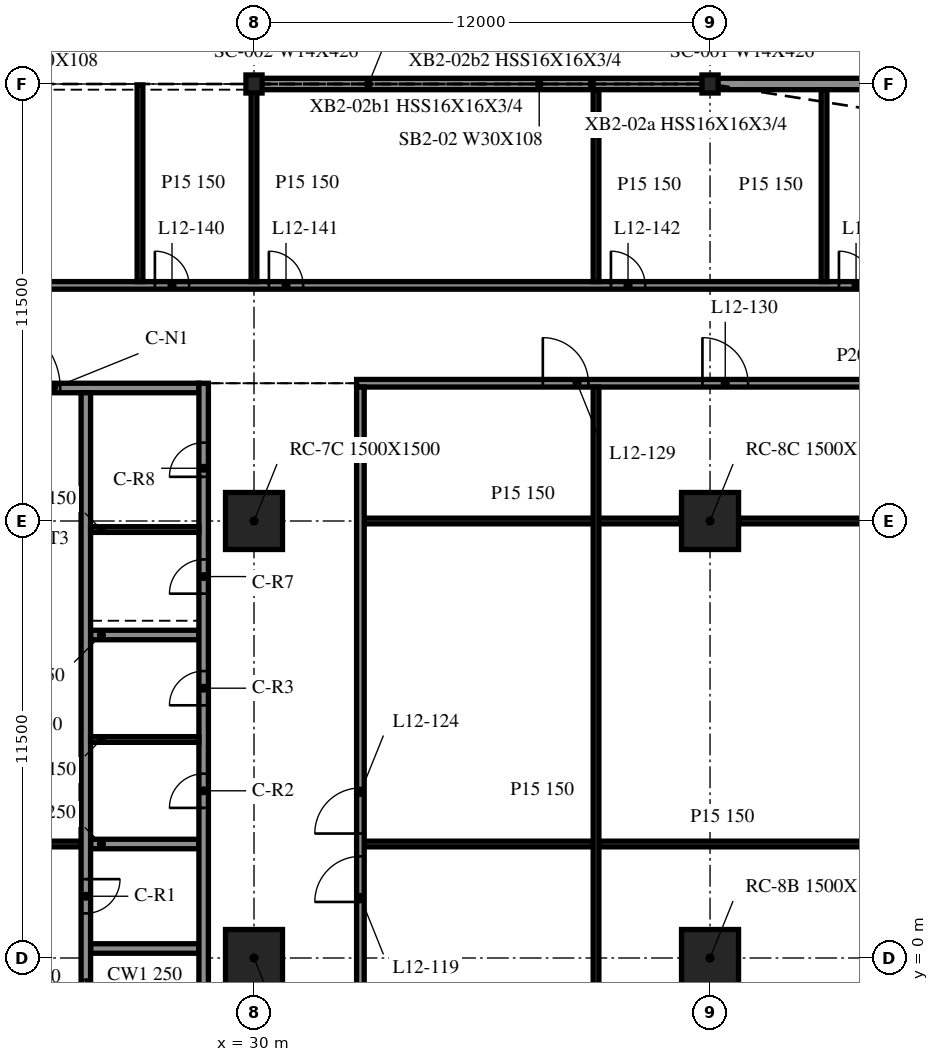
"""IFC4 building model, lengths in metres.
Left out: names, types, materials, properties, quantities, classifications, styles, units other than length and angle.
Written with IfcOpenShell. Run it as: python <this file> out.ifc"""

import sys

from ifc_helpers import new_model, si_unit, direction, frame, frame_2d, origin, origin_2d, place, context, subcontext, project, spatial, rectangle, i_section, extrude, element, fill, save


model = new_model("IFC4")
c1 = context("Model", 3, precision=1e-05, world=origin(), true_north=direction((0.0, 1.0)))
c2 = subcontext(c1, "Body", "Model", "MODEL_VIEW")
j1 = project(units=[si_unit("LENGTHUNIT", "METRE"), si_unit("PLANEANGLEUNIT", "RADIAN")], contexts=[c1])
p1 = place(None, origin())
s1 = spatial("IfcSite", under=j1, at=p1, CompositionType="ELEMENT")
p2 = place(p1, origin())
s2 = spatial("IfcBuilding", under=s1, at=p2, CompositionType="ELEMENT")
p3 = place(p2, frame((0.0, 0.0, 54.6)))
s3 = spatial("IfcBuildingStorey", under=s2, at=p3, CompositionType="ELEMENT", Elevation=54.6)
for number, where, z_axis, x_axis in (
    (1, (30.0, 0.0, -0.34), (0.0, 0.0, 1.0), (1.0, 0.0, 0.0)),
    (2, (30.0, 11.5, -0.34), (0.0, 0.0, 1.0), (1.0, 0.0, 0.0)),
    (3, (42.0, 0.0, -0.34), (0.0, 0.0, 1.0), (1.0, 0.0, 0.0)),
    (4, (42.0, 11.5, -0.34), (0.0, 0.0, 1.0), (1.0, 0.0, 0.0)),
):
    element("IfcColumn", number, at=place(p3, frame(where, z_axis=z_axis, x_axis=x_axis)), inside=s3, PredefinedType="COLUMN", context=c2, shape_type="SweptSolid", body=[
        extrude(rectangle(XDim=1.5, YDim=1.5, at=origin_2d()), origin(), (0.0, 0.0, 1.0), 4.3),
    ])
for number, where, z_axis, x_axis in (
    (5, (42.0, 23.0, -0.34), (0.0, 0.0, 1.0), (1.0, 0.0, 0.0)),
    (6, (30.0, 23.0, -0.34), (0.0, 0.0, 1.0), (1.0, 0.0, 0.0)),
):
    element("IfcColumn", number, at=place(p3, frame(where, z_axis=z_axis, x_axis=x_axis)), inside=s3, PredefinedType="COLUMN", context=c2, shape_type="SweptSolid", body=[
        extrude(i_section(OverallWidth=0.424, OverallDepth=0.475, WebThickness=0.048, FlangeThickness=0.077, at=origin_2d()), origin(), (0.0, 0.0, 1.0), 4.3),
    ])
p4 = place(p3, frame((48.0, 23.0, 0.0), z_axis=(0.0, 0.0, 1.0), x_axis=(-1.0, 0.0, 0.0)))
e7 = element("IfcWall", 7, at=p4, inside=s3, PredefinedType="NOTDEFINED", context=c2, shape_type="SweptSolid", body=[
    extrude(rectangle(XDim=5.976, YDim=0.3, at=frame_2d((2.988, 0.0))), origin(), (0.0, 0.0, 1.0), 3.203),
])
p5 = place(p3, frame((41.976, 23.0, 0.0), z_axis=(0.0, 0.0, 1.0), x_axis=(-1.0, 0.0, 0.0)))
e8 = element("IfcWall", 8, at=p5, inside=s3, PredefinedType="NOTDEFINED", context=c2, shape_type="SweptSolid", body=[
    extrude(rectangle(XDim=11.952, YDim=0.3, at=frame_2d((5.976, 0.0))), origin(), (0.0, 0.0, 1.0), 3.203),
])
p6 = place(p3, frame((28.675, -9.125, 0.0), z_axis=(0.0, 0.0, 1.0), x_axis=(0.0, 1.0, 0.0)))
e9 = element("IfcWall", 9, at=p6, inside=s3, PredefinedType="SOLIDWALL", context=c2, shape_type="SweptSolid", body=[
    extrude(rectangle(XDim=24.25, YDim=0.25, at=frame_2d((12.125, 0.0))), origin(), (0.0, 0.0, 1.0), 3.96),
])
p7 = place(p6, frame((13.075, 0.0, 0.0)))
e10 = element("IfcOpeningElement", 10, at=p7, cuts=e9, PredefinedType="OPENING", context=c2, shape_type="SweptSolid", body=[
    extrude(rectangle(XDim=0.9, YDim=2.1, at=frame_2d((0.45, 1.05))), frame((0.0, 0.135, 0.0), z_axis=(0.0, -1.0, 0.0), x_axis=(1.0, 0.0, 0.0)), (0.0, 0.0, 1.0), 0.27),
])
p8 = place(p6, frame((15.775, 0.0, 0.0)))
e11 = element("IfcOpeningElement", 11, at=p8, cuts=e9, PredefinedType="OPENING", context=c2, shape_type="SweptSolid", body=[
    extrude(rectangle(XDim=0.9, YDim=2.1, at=frame_2d((0.45, 1.05))), frame((0.0, 0.135, 0.0), z_axis=(0.0, -1.0, 0.0), x_axis=(1.0, 0.0, 0.0)), (0.0, 0.0, 1.0), 0.27),
])
p9 = place(p6, frame((18.712, 0.0, 0.0)))
e12 = element("IfcOpeningElement", 12, at=p9, cuts=e9, PredefinedType="OPENING", context=c2, shape_type="SweptSolid", body=[
    extrude(rectangle(XDim=0.9, YDim=2.1, at=frame_2d((0.45, 1.05))), frame((0.0, 0.135, 0.0), z_axis=(0.0, -1.0, 0.0), x_axis=(1.0, 0.0, 0.0)), (0.0, 0.0, 1.0), 0.27),
])
p10 = place(p6, frame((21.788, 0.0, 0.0)))
e13 = element("IfcOpeningElement", 13, at=p10, cuts=e9, PredefinedType="OPENING", context=c2, shape_type="SweptSolid", body=[
    extrude(rectangle(XDim=0.9, YDim=2.1, at=frame_2d((0.45, 1.05))), frame((0.0, 0.135, 0.0), z_axis=(0.0, -1.0, 0.0), x_axis=(1.0, 0.0, 0.0)), (0.0, 0.0, 1.0), 0.27),
])
p11 = place(p3, frame((19.45, 15.0, 0.0), z_axis=(0.0, 0.0, 1.0), x_axis=(1.0, 0.0, 0.0)))
e14 = element("IfcWall", 14, at=p11, inside=s3, PredefinedType="SOLIDWALL", context=c2, shape_type="SweptSolid", body=[
    extrude(rectangle(XDim=9.1, YDim=0.25, at=frame_2d((4.55, 0.0))), origin(), (0.0, 0.0, 1.0), 3.96),
])
p12 = place(p11, frame((3.65, 0.0, 0.0)))
e15 = element("IfcOpeningElement", 15, at=p12, cuts=e14, PredefinedType="OPENING", context=c2, shape_type="SweptSolid", body=[
    extrude(rectangle(XDim=1.8, YDim=2.1, at=frame_2d((0.9, 1.05))), frame((0.0, 0.135, 0.0), z_axis=(0.0, -1.0, 0.0), x_axis=(1.0, 0.0, 0.0)), (0.0, 0.0, 1.0), 0.27),
])
p13 = place(p3, frame((25.575, 14.875, 0.0), z_axis=(0.0, 0.0, 1.0), x_axis=(0.0, -1.0, 0.0)))
e16 = element("IfcWall", 16, at=p13, inside=s3, PredefinedType="SOLIDWALL", context=c2, shape_type="SweptSolid", body=[
    extrude(rectangle(XDim=17.5, YDim=0.25, at=frame_2d((8.75, 0.0))), origin(), (0.0, 0.0, 1.0), 3.96),
])
p14 = place(p13, frame((15.45, 0.0, 0.0)))
e17 = element("IfcOpeningElement", 17, at=p14, cuts=e16, PredefinedType="OPENING", context=c2, shape_type="SweptSolid", body=[
    extrude(rectangle(XDim=1.1, YDim=2.1, at=frame_2d((0.55, 1.05))), frame((0.0, 0.135, 0.0), z_axis=(0.0, -1.0, 0.0), x_axis=(1.0, 0.0, 0.0)), (0.0, 0.0, 1.0), 0.27),
])
p15 = place(p13, frame((12.8, 0.0, 0.0)))
e18 = element("IfcOpeningElement", 18, at=p15, cuts=e16, PredefinedType="OPENING", context=c2, shape_type="SweptSolid", body=[
    extrude(rectangle(XDim=0.9, YDim=2.1, at=frame_2d((0.45, 1.05))), frame((0.0, 0.135, 0.0), z_axis=(0.0, -1.0, 0.0), x_axis=(1.0, 0.0, 0.0)), (0.0, 0.0, 1.0), 0.27),
])
for number, where, z_axis, x_axis in (
    (19, (25.7, 0.25, 0.0), (0.0, 0.0, 1.0), (1.0, 0.0, 0.0)),
    (20, (25.7, 3.0, 0.0), (0.0, 0.0, 1.0), (1.0, 0.0, 0.0)),
    (21, (25.7, 8.5, 0.0), (0.0, 0.0, 1.0), (1.0, 0.0, 0.0)),
):
    element("IfcWall", number, at=place(p3, frame(where, z_axis=z_axis, x_axis=x_axis)), inside=s3, PredefinedType="SOLIDWALL", context=c2, shape_type="SweptSolid", body=[
        extrude(rectangle(XDim=2.85, YDim=0.25, at=frame_2d((1.425, 0.0))), origin(), (0.0, 0.0, 1.0), 3.96),
    ])
p16 = place(p3, frame((22.55, 3.0, 0.0), z_axis=(0.0, 0.0, 1.0), x_axis=(1.0, 0.0, 0.0)))
e22 = element("IfcWall", 22, at=p16, inside=s3, PredefinedType="PARTITIONING", context=c2, shape_type="SweptSolid", body=[
    extrude(rectangle(XDim=2.9, YDim=0.15, at=frame_2d((1.45, 0.0))), origin(), (0.0, 0.0, 1.0), 3.96),
])
for number, where, z_axis, x_axis in (
    (23, (25.7, 5.75, 0.0), (0.0, 0.0, 1.0), (1.0, 0.0, 0.0)),
    (24, (25.7, 11.275, 0.0), (0.0, 0.0, 1.0), (1.0, 0.0, 0.0)),
):
    element("IfcWall", number, at=place(p3, frame(where, z_axis=z_axis, x_axis=x_axis)), inside=s3, PredefinedType="PARTITIONING", context=c2, shape_type="SweptSolid", body=[
        extrude(rectangle(XDim=2.85, YDim=0.15, at=frame_2d((1.425, 0.0))), origin(), (0.0, 0.0, 1.0), 3.96),
    ])
p17 = place(p3, frame((32.9, 3.0, 0.0), z_axis=(0.0, 0.0, 1.0), x_axis=(1.0, 0.0, 0.0)))
e25 = element("IfcWall", 25, at=p17, inside=s3, PredefinedType="PARTITIONING", context=c2, shape_type="SweptSolid", body=[
    extrude(rectangle(XDim=18.85, YDim=0.15, at=frame_2d((9.425, 0.0))), origin(), (0.0, 0.0, 1.0), 3.96),
])
p18 = place(p3, frame((32.9, 11.5, 0.0), z_axis=(0.0, 0.0, 1.0), x_axis=(1.0, 0.0, 0.0)))
e26 = element("IfcWall", 26, at=p18, inside=s3, PredefinedType="PARTITIONING", context=c2, shape_type="SweptSolid", body=[
    extrude(rectangle(XDim=8.35, YDim=0.15, at=frame_2d((4.175, 0.0))), origin(), (0.0, 0.0, 1.0), 3.96),
])
p19 = place(p3, frame((42.75, 11.5, 0.0), z_axis=(0.0, 0.0, 1.0), x_axis=(1.0, 0.0, 0.0)))
e27 = element("IfcWall", 27, at=p19, inside=s3, PredefinedType="PARTITIONING", context=c2, shape_type="SweptSolid", body=[
    extrude(rectangle(XDim=9.0, YDim=0.15, at=frame_2d((4.5, 0.0))), origin(), (0.0, 0.0, 1.0), 3.96),
])
p20 = place(p3, frame((32.7, 15.125, 0.0), z_axis=(0.0, 0.0, 1.0), x_axis=(1.0, 0.0, 0.0)))
e28 = element("IfcWall", 28, at=p20, inside=s3, PredefinedType="PARTITIONING", context=c2, shape_type="SweptSolid", body=[
    extrude(rectangle(XDim=19.25, YDim=0.2, at=frame_2d((9.625, 0.0))), origin(), (0.0, 0.0, 1.0), 3.96),
])
p21 = place(p20, frame((4.9, 0.0, 0.0)))
e29 = element("IfcOpeningElement", 29, at=p21, cuts=e28, PredefinedType="OPENING", context=c2, shape_type="SweptSolid", body=[
    extrude(rectangle(XDim=1.2, YDim=2.1, at=frame_2d((0.6, 1.05))), frame((0.0, 0.11, 0.0), z_axis=(0.0, -1.0, 0.0), x_axis=(1.0, 0.0, 0.0)), (0.0, 0.0, 1.0), 0.22),
])
p22 = place(p20, frame((9.1, 0.0, 0.0)))
e30 = element("IfcOpeningElement", 30, at=p22, cuts=e28, PredefinedType="OPENING", context=c2, shape_type="SweptSolid", body=[
    extrude(rectangle(XDim=1.2, YDim=2.1, at=frame_2d((0.6, 1.05))), frame((0.0, 0.11, 0.0), z_axis=(0.0, -1.0, 0.0), x_axis=(1.0, 0.0, 0.0)), (0.0, 0.0, 1.0), 0.22),
])
p23 = place(p3, frame((-41.708, 17.7, 0.0), z_axis=(0.0, 0.0, 1.0), x_axis=(1.0, 0.0, 0.0)))
e31 = element("IfcWall", 31, at=p23, inside=s3, PredefinedType="PARTITIONING", context=c2, shape_type="SweptSolid", body=[
    extrude(rectangle(XDim=95.416, YDim=0.2, at=frame_2d((47.708, 0.0))), origin(), (0.0, 0.0, 1.0), 3.96),
])
p24 = place(p23, frame((7.5, 0.0, 0.0)))
e32 = element("IfcOpeningElement", 32, at=p24, cuts=e31, PredefinedType="OPENING", context=c2, shape_type="SweptSolid", body=[
    extrude(rectangle(XDim=0.9, YDim=2.1, at=frame_2d((0.45, 1.05))), frame((0.0, 0.11, 0.0), z_axis=(0.0, -1.0, 0.0), x_axis=(1.0, 0.0, 0.0)), (0.0, 0.0, 1.0), 0.22),
])
p25 = place(p23, frame((13.5, 0.0, 0.0)))
e33 = element("IfcOpeningElement", 33, at=p25, cuts=e31, PredefinedType="OPENING", context=c2, shape_type="SweptSolid", body=[
    extrude(rectangle(XDim=0.9, YDim=2.1, at=frame_2d((0.45, 1.05))), frame((0.0, 0.11, 0.0), z_axis=(0.0, -1.0, 0.0), x_axis=(1.0, 0.0, 0.0)), (0.0, 0.0, 1.0), 0.22),
])
p26 = place(p23, frame((19.5, 0.0, 0.0)))
e34 = element("IfcOpeningElement", 34, at=p26, cuts=e31, PredefinedType="OPENING", context=c2, shape_type="SweptSolid", body=[
    extrude(rectangle(XDim=0.9, YDim=2.1, at=frame_2d((0.45, 1.05))), frame((0.0, 0.11, 0.0), z_axis=(0.0, -1.0, 0.0), x_axis=(1.0, 0.0, 0.0)), (0.0, 0.0, 1.0), 0.22),
])
p27 = place(p23, frame((31.5, 0.0, 0.0)))
e35 = element("IfcOpeningElement", 35, at=p27, cuts=e31, PredefinedType="OPENING", context=c2, shape_type="SweptSolid", body=[
    extrude(rectangle(XDim=0.9, YDim=2.1, at=frame_2d((0.45, 1.05))), frame((0.0, 0.11, 0.0), z_axis=(0.0, -1.0, 0.0), x_axis=(1.0, 0.0, 0.0)), (0.0, 0.0, 1.0), 0.22),
])
p28 = place(p23, frame((34.5, 0.0, 0.0)))
e36 = element("IfcOpeningElement", 36, at=p28, cuts=e31, PredefinedType="OPENING", context=c2, shape_type="SweptSolid", body=[
    extrude(rectangle(XDim=0.9, YDim=2.1, at=frame_2d((0.45, 1.05))), frame((0.0, 0.11, 0.0), z_axis=(0.0, -1.0, 0.0), x_axis=(1.0, 0.0, 0.0)), (0.0, 0.0, 1.0), 0.22),
])
p29 = place(p23, frame((43.5, 0.0, 0.0)))
e37 = element("IfcOpeningElement", 37, at=p29, cuts=e31, PredefinedType="OPENING", context=c2, shape_type="SweptSolid", body=[
    extrude(rectangle(XDim=0.9, YDim=2.1, at=frame_2d((0.45, 1.05))), frame((0.0, 0.11, 0.0), z_axis=(0.0, -1.0, 0.0), x_axis=(1.0, 0.0, 0.0)), (0.0, 0.0, 1.0), 0.22),
])
p30 = place(p23, frame((47.3, 0.0, 0.0)))
e38 = element("IfcOpeningElement", 38, at=p30, cuts=e31, PredefinedType="OPENING", context=c2, shape_type="SweptSolid", body=[
    extrude(rectangle(XDim=0.9, YDim=2.1, at=frame_2d((0.45, 1.05))), frame((0.0, 0.11, 0.0), z_axis=(0.0, -1.0, 0.0), x_axis=(1.0, 0.0, 0.0)), (0.0, 0.0, 1.0), 0.22),
])
p31 = place(p23, frame((51.1, 0.0, 0.0)))
e39 = element("IfcOpeningElement", 39, at=p31, cuts=e31, PredefinedType="OPENING", context=c2, shape_type="SweptSolid", body=[
    extrude(rectangle(XDim=0.9, YDim=2.1, at=frame_2d((0.45, 1.05))), frame((0.0, 0.11, 0.0), z_axis=(0.0, -1.0, 0.0), x_axis=(1.0, 0.0, 0.0)), (0.0, 0.0, 1.0), 0.22),
])
p32 = place(p23, frame((57.1, 0.0, 0.0)))
e40 = element("IfcOpeningElement", 40, at=p32, cuts=e31, PredefinedType="OPENING", context=c2, shape_type="SweptSolid", body=[
    extrude(rectangle(XDim=0.9, YDim=2.1, at=frame_2d((0.45, 1.05))), frame((0.0, 0.11, 0.0), z_axis=(0.0, -1.0, 0.0), x_axis=(1.0, 0.0, 0.0)), (0.0, 0.0, 1.0), 0.22),
])
p33 = place(p23, frame((69.1, 0.0, 0.0)))
e41 = element("IfcOpeningElement", 41, at=p33, cuts=e31, PredefinedType="OPENING", context=c2, shape_type="SweptSolid", body=[
    extrude(rectangle(XDim=0.9, YDim=2.1, at=frame_2d((0.45, 1.05))), frame((0.0, 0.11, 0.0), z_axis=(0.0, -1.0, 0.0), x_axis=(1.0, 0.0, 0.0)), (0.0, 0.0, 1.0), 0.22),
])
p34 = place(p23, frame((72.1, 0.0, 0.0)))
e42 = element("IfcOpeningElement", 42, at=p34, cuts=e31, PredefinedType="OPENING", context=c2, shape_type="SweptSolid", body=[
    extrude(rectangle(XDim=0.9, YDim=2.1, at=frame_2d((0.45, 1.05))), frame((0.0, 0.11, 0.0), z_axis=(0.0, -1.0, 0.0), x_axis=(1.0, 0.0, 0.0)), (0.0, 0.0, 1.0), 0.22),
])
p35 = place(p23, frame((81.1, 0.0, 0.0)))
e43 = element("IfcOpeningElement", 43, at=p35, cuts=e31, PredefinedType="OPENING", context=c2, shape_type="SweptSolid", body=[
    extrude(rectangle(XDim=0.9, YDim=2.1, at=frame_2d((0.45, 1.05))), frame((0.0, 0.11, 0.0), z_axis=(0.0, -1.0, 0.0), x_axis=(1.0, 0.0, 0.0)), (0.0, 0.0, 1.0), 0.22),
])
p36 = place(p23, frame((87.1, 0.0, 0.0)))
e44 = element("IfcOpeningElement", 44, at=p36, cuts=e31, PredefinedType="OPENING", context=c2, shape_type="SweptSolid", body=[
    extrude(rectangle(XDim=0.9, YDim=2.1, at=frame_2d((0.45, 1.05))), frame((0.0, 0.11, 0.0), z_axis=(0.0, -1.0, 0.0), x_axis=(1.0, 0.0, 0.0)), (0.0, 0.0, 1.0), 0.22),
])
for number, where, z_axis, x_axis in (
    (45, (27.0, 17.8, 0.0), (0.0, 0.0, 1.0), (0.0, 1.0, 0.0)),
    (46, (30.0, 17.8, 0.0), (0.0, 0.0, 1.0), (0.0, 1.0, 0.0)),
):
    element("IfcWall", number, at=place(p3, frame(where, z_axis=z_axis, x_axis=x_axis)), inside=s3, PredefinedType="PARTITIONING", context=c2, shape_type="SweptSolid", body=[
        extrude(rectangle(XDim=5.175, YDim=0.15, at=frame_2d((2.587, 0.0))), origin(), (0.0, 0.0, 1.0), 3.96),
    ])
p37 = place(p3, frame((32.8, -9.025, 0.0), z_axis=(0.0, 0.0, 1.0), x_axis=(0.0, 1.0, 0.0)))
e47 = element("IfcWall", 47, at=p37, inside=s3, PredefinedType="PARTITIONING", context=c2, shape_type="SweptSolid", body=[
    extrude(rectangle(XDim=24.05, YDim=0.2, at=frame_2d((12.025, 0.0))), origin(), (0.0, 0.0, 1.0), 3.96),
])
p38 = place(p37, frame((10.5, 0.0, 0.0)))
e48 = element("IfcOpeningElement", 48, at=p38, cuts=e47, PredefinedType="OPENING", context=c2, shape_type="SweptSolid", body=[
    extrude(rectangle(XDim=1.2, YDim=2.1, at=frame_2d((0.6, 1.05))), frame((0.0, 0.11, 0.0), z_axis=(0.0, -1.0, 0.0), x_axis=(1.0, 0.0, 0.0)), (0.0, 0.0, 1.0), 0.22),
])
p39 = place(p37, frame((12.3, 0.0, 0.0)))
e49 = element("IfcOpeningElement", 49, at=p39, cuts=e47, PredefinedType="OPENING", context=c2, shape_type="SweptSolid", body=[
    extrude(rectangle(XDim=1.2, YDim=2.1, at=frame_2d((0.6, 1.05))), frame((0.0, 0.11, 0.0), z_axis=(0.0, -1.0, 0.0), x_axis=(1.0, 0.0, 0.0)), (0.0, 0.0, 1.0), 0.22),
])
p40 = place(p3, frame((39.0, -9.025, 0.0), z_axis=(0.0, 0.0, 1.0), x_axis=(0.0, 1.0, 0.0)))
e50 = element("IfcWall", 50, at=p40, inside=s3, PredefinedType="PARTITIONING", context=c2, shape_type="SweptSolid", body=[
    extrude(rectangle(XDim=24.05, YDim=0.15, at=frame_2d((12.025, 0.0))), origin(), (0.0, 0.0, 1.0), 3.96),
])
for number, where, z_axis, x_axis in (
    (51, (39.0, 17.8, 0.0), (0.0, 0.0, 1.0), (0.0, 1.0, 0.0)),
    (52, (45.0, 17.8, 0.0), (0.0, 0.0, 1.0), (0.0, 1.0, 0.0)),
):
    element("IfcWall", number, at=place(p3, frame(where, z_axis=z_axis, x_axis=x_axis)), inside=s3, PredefinedType="PARTITIONING", context=c2, shape_type="SweptSolid", body=[
        extrude(rectangle(XDim=5.05, YDim=0.15, at=frame_2d((2.525, 0.0))), origin(), (0.0, 0.0, 1.0), 3.96),
    ])
p41 = place(p12, origin())
e53 = element("IfcDoor", 53, at=p41, inside=s3, OperationType="DOUBLE_DOOR_SINGLE_SWING", PredefinedType="DOOR", context=c2, shape_type="SweptSolid", body=[
    extrude(rectangle(XDim=1.8, YDim=2.1, at=frame_2d((0.9, 1.05))), frame((0.0, 0.025, 0.0), z_axis=(0.0, -1.0, 0.0), x_axis=(1.0, 0.0, 0.0)), (0.0, 0.0, 1.0), 0.05),
])
fill(e15, e53)
p42 = place(p14, origin())
e54 = element("IfcDoor", 54, at=p42, inside=s3, OperationType="DOUBLE_DOOR_SLIDING", PredefinedType="DOOR", context=c2, shape_type="SweptSolid", body=[
    extrude(rectangle(XDim=1.1, YDim=2.1, at=frame_2d((0.55, 1.05))), frame((0.0, 0.025, 0.0), z_axis=(0.0, -1.0, 0.0), x_axis=(1.0, 0.0, 0.0)), (0.0, 0.0, 1.0), 0.05),
])
fill(e17, e54)
p43 = place(p15, origin())
e55 = element("IfcDoor", 55, at=p43, inside=s3, OperationType="SINGLE_SWING_LEFT", PredefinedType="DOOR", context=c2, shape_type="SweptSolid", body=[
    extrude(rectangle(XDim=0.9, YDim=2.1, at=frame_2d((0.45, 1.05))), frame((0.0, 0.025, 0.0), z_axis=(0.0, -1.0, 0.0), x_axis=(1.0, 0.0, 0.0)), (0.0, 0.0, 1.0), 0.05),
])
fill(e18, e55)
p44 = place(p7, origin())
e56 = element("IfcDoor", 56, at=p44, inside=s3, OperationType="SINGLE_SWING_RIGHT", PredefinedType="DOOR", context=c2, shape_type="SweptSolid", body=[
    extrude(rectangle(XDim=0.9, YDim=2.1, at=frame_2d((0.45, 1.05))), frame((0.0, 0.025, 0.0), z_axis=(0.0, -1.0, 0.0), x_axis=(1.0, 0.0, 0.0)), (0.0, 0.0, 1.0), 0.05),
])
fill(e10, e56)
p45 = place(p8, origin())
e57 = element("IfcDoor", 57, at=p45, inside=s3, OperationType="SINGLE_SWING_LEFT", PredefinedType="DOOR", context=c2, shape_type="SweptSolid", body=[
    extrude(rectangle(XDim=0.9, YDim=2.1, at=frame_2d((0.45, 1.05))), frame((0.0, 0.025, 0.0), z_axis=(0.0, -1.0, 0.0), x_axis=(1.0, 0.0, 0.0)), (0.0, 0.0, 1.0), 0.05),
])
fill(e11, e57)
p46 = place(p9, origin())
e58 = element("IfcDoor", 58, at=p46, inside=s3, OperationType="SINGLE_SWING_LEFT", PredefinedType="DOOR", context=c2, shape_type="SweptSolid", body=[
    extrude(rectangle(XDim=0.9, YDim=2.1, at=frame_2d((0.45, 1.05))), frame((0.0, 0.025, 0.0), z_axis=(0.0, -1.0, 0.0), x_axis=(1.0, 0.0, 0.0)), (0.0, 0.0, 1.0), 0.05),
])
fill(e12, e58)
p47 = place(p10, origin())
e59 = element("IfcDoor", 59, at=p47, inside=s3, OperationType="SINGLE_SWING_RIGHT", PredefinedType="DOOR", context=c2, shape_type="SweptSolid", body=[
    extrude(rectangle(XDim=0.9, YDim=2.1, at=frame_2d((0.45, 1.05))), frame((0.0, 0.025, 0.0), z_axis=(0.0, -1.0, 0.0), x_axis=(1.0, 0.0, 0.0)), (0.0, 0.0, 1.0), 0.05),
])
fill(e13, e59)
p48 = place(p38, origin())
e60 = element("IfcDoor", 60, at=p48, inside=s3, OperationType="SINGLE_SWING_RIGHT", PredefinedType="DOOR", context=c2, shape_type="SweptSolid", body=[
    extrude(rectangle(XDim=1.2, YDim=2.1, at=frame_2d((0.6, 1.05))), frame((0.0, 0.025, 0.0), z_axis=(0.0, -1.0, 0.0), x_axis=(1.0, 0.0, 0.0)), (0.0, 0.0, 1.0), 0.05),
])
fill(e48, e60)
p49 = place(p39, origin())
e61 = element("IfcDoor", 61, at=p49, inside=s3, OperationType="SINGLE_SWING_LEFT", PredefinedType="DOOR", context=c2, shape_type="SweptSolid", body=[
    extrude(rectangle(XDim=1.2, YDim=2.1, at=frame_2d((0.6, 1.05))), frame((0.0, 0.025, 0.0), z_axis=(0.0, -1.0, 0.0), x_axis=(1.0, 0.0, 0.0)), (0.0, 0.0, 1.0), 0.05),
])
fill(e49, e61)
p50 = place(p21, origin())
e62 = element("IfcDoor", 62, at=p50, inside=s3, OperationType="SINGLE_SWING_RIGHT", PredefinedType="DOOR", context=c2, shape_type="SweptSolid", body=[
    extrude(rectangle(XDim=1.2, YDim=2.1, at=frame_2d((0.6, 1.05))), frame((0.0, 0.025, 0.0), z_axis=(0.0, -1.0, 0.0), x_axis=(1.0, 0.0, 0.0)), (0.0, 0.0, 1.0), 0.05),
])
fill(e29, e62)
p51 = place(p22, origin())
e63 = element("IfcDoor", 63, at=p51, inside=s3, OperationType="SINGLE_SWING_LEFT", PredefinedType="DOOR", context=c2, shape_type="SweptSolid", body=[
    extrude(rectangle(XDim=1.2, YDim=2.1, at=frame_2d((0.6, 1.05))), frame((0.0, 0.025, 0.0), z_axis=(0.0, -1.0, 0.0), x_axis=(1.0, 0.0, 0.0)), (0.0, 0.0, 1.0), 0.05),
])
fill(e30, e63)
p52 = place(p33, origin())
e64 = element("IfcDoor", 64, at=p52, inside=s3, OperationType="SINGLE_SWING_RIGHT", PredefinedType="DOOR", context=c2, shape_type="SweptSolid", body=[
    extrude(rectangle(XDim=0.9, YDim=2.1, at=frame_2d((0.45, 1.05))), frame((0.0, 0.025, 0.0), z_axis=(0.0, -1.0, 0.0), x_axis=(1.0, 0.0, 0.0)), (0.0, 0.0, 1.0), 0.05),
])
fill(e41, e64)
p53 = place(p34, origin())
e65 = element("IfcDoor", 65, at=p53, inside=s3, OperationType="SINGLE_SWING_RIGHT", PredefinedType="DOOR", context=c2, shape_type="SweptSolid", body=[
    extrude(rectangle(XDim=0.9, YDim=2.1, at=frame_2d((0.45, 1.05))), frame((0.0, 0.025, 0.0), z_axis=(0.0, -1.0, 0.0), x_axis=(1.0, 0.0, 0.0)), (0.0, 0.0, 1.0), 0.05),
])
fill(e42, e65)
p54 = place(p35, origin())
e66 = element("IfcDoor", 66, at=p54, inside=s3, OperationType="SINGLE_SWING_RIGHT", PredefinedType="DOOR", context=c2, shape_type="SweptSolid", body=[
    extrude(rectangle(XDim=0.9, YDim=2.1, at=frame_2d((0.45, 1.05))), frame((0.0, 0.025, 0.0), z_axis=(0.0, -1.0, 0.0), x_axis=(1.0, 0.0, 0.0)), (0.0, 0.0, 1.0), 0.05),
])
fill(e43, e66)
p55 = place(p36, origin())
e67 = element("IfcDoor", 67, at=p55, inside=s3, OperationType="SINGLE_SWING_RIGHT", PredefinedType="DOOR", context=c2, shape_type="SweptSolid", body=[
    extrude(rectangle(XDim=0.9, YDim=2.1, at=frame_2d((0.45, 1.05))), frame((0.0, 0.025, 0.0), z_axis=(0.0, -1.0, 0.0), x_axis=(1.0, 0.0, 0.0)), (0.0, 0.0, 1.0), 0.05),
])
fill(e44, e67)
save(model, sys.argv[1])
